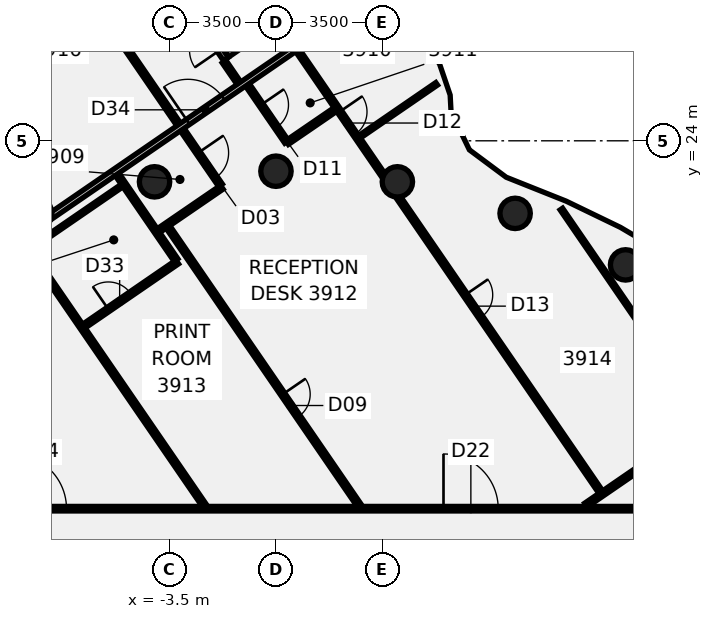
"""IFC4 building model, lengths in metres.
Left out: names, types, materials, properties, quantities, classifications, styles, units other than length and angle.
Written with IfcOpenShell. Run it as: python <this file> out.ifc"""

import sys

from ifc_helpers import new_model, si_unit, direction, frame, frame_2d, origin, origin_2d, place, context, subcontext, project, spatial, rectangle, circle, extrude, element, fill, save


model = new_model("IFC4")
c1 = context("Model", 3, precision=1e-05, world=origin(), true_north=direction((0.0, 1.0)))
c2 = subcontext(c1, "Body", "Model", "MODEL_VIEW")
j1 = project(units=[si_unit("LENGTHUNIT", "METRE"), si_unit("PLANEANGLEUNIT", "RADIAN")], contexts=[c1])
p1 = place(None, origin())
s1 = spatial("IfcSite", under=j1, at=p1, CompositionType="ELEMENT")
p2 = place(p1, origin())
s2 = spatial("IfcBuilding", under=s1, at=p2, CompositionType="ELEMENT")
p3 = place(p2, frame((0.0, 0.0, 159.25)))
s3 = spatial("IfcBuildingStorey", under=s2, at=p3, CompositionType="ELEMENT", Elevation=159.25)
for number, where, z_axis, x_axis in (
    (1, (11.5, 19.919, -0.14), (0.0, 0.0, 1.0), (1.0, 0.0, 0.0)),
    (2, (7.866, 21.613, -0.14), (0.0, 0.0, 1.0), (1.0, 0.0, 0.0)),
    (3, (3.994, 22.651, -0.14), (0.0, 0.0, 1.0), (1.0, 0.0, 0.0)),
    (4, (0.0, 23.0, -0.14), (0.0, 0.0, 1.0), (1.0, 0.0, 0.0)),
    (5, (-3.994, 22.651, -0.14), (0.0, 0.0, 1.0), (1.0, 0.0, 0.0)),
    (6, (-7.866, 21.613, -0.14), (0.0, 0.0, 1.0), (1.0, 0.0, 0.0)),
):
    element("IfcColumn", number, at=place(p3, frame(where, z_axis=z_axis, x_axis=x_axis)), inside=s3, PredefinedType="COLUMN", context=c2, shape_type="SweptSolid", body=[
        extrude(circle(Radius=0.5, at=origin_2d()), origin(), (0.0, 0.0, 1.0), 3.75),
    ])
p4 = place(p3, frame((-13.285, 39.225, 0.0), z_axis=(0.0, 0.0, 1.0), x_axis=(0.566080388425, -0.824350043271, 0.0)))
e7 = element("IfcWall", 7, at=p4, inside=s3, PredefinedType="PARTITIONING", context=c2, shape_type="SweptSolid", body=[
    extrude(rectangle(XDim=20.244, YDim=0.15, at=frame_2d((10.122, 0.0))), origin(), (0.0, 0.0, 1.0), 3.01),
])
p5 = place(p4, frame((18.95, 0.0, 0.0)))
e8 = element("IfcOpeningElement", 8, at=p5, cuts=e7, PredefinedType="OPENING", context=c2, shape_type="SweptSolid", body=[
    extrude(rectangle(XDim=1.0, YDim=2.1, at=frame_2d((0.5, 1.05))), frame((0.0, 0.085, 0.0), z_axis=(0.0, -1.0, 0.0), x_axis=(1.0, 0.0, 0.0)), (0.0, 0.0, 1.0), 0.17),
])
p6 = place(p4, frame((8.769, 0.0, 0.0)))
e9 = element("IfcOpeningElement", 9, at=p6, cuts=e7, PredefinedType="OPENING", context=c2, shape_type="SweptSolid", body=[
    extrude(rectangle(XDim=0.9, YDim=2.1, at=frame_2d((0.45, 1.05))), frame((0.0, 0.085, 0.0), z_axis=(0.0, -1.0, 0.0), x_axis=(1.0, 0.0, 0.0)), (0.0, 0.0, 1.0), 0.17),
])
p7 = place(p4, frame((2.32, 0.0, 0.0)))
e10 = element("IfcOpeningElement", 10, at=p7, cuts=e7, PredefinedType="OPENING", context=c2, shape_type="SweptSolid", body=[
    extrude(rectangle(XDim=0.9, YDim=2.1, at=frame_2d((0.45, 1.05))), frame((0.0, 0.085, 0.0), z_axis=(0.0, -1.0, 0.0), x_axis=(1.0, 0.0, 0.0)), (0.0, 0.0, 1.0), 0.17),
])
p8 = place(p3, frame((-1.705, 26.603, 0.0), z_axis=(0.0, 0.0, 1.0), x_axis=(0.566118871714, -0.824323615511, 0.0)))
e11 = element("IfcWall", 11, at=p8, inside=s3, PredefinedType="PARTITIONING", context=c2, shape_type="SweptSolid", body=[
    extrude(rectangle(XDim=0.859, YDim=0.15, at=frame_2d((0.43, 0.0))), origin(), (0.0, 0.0, 1.0), 3.01),
])
p9 = place(p3, frame((-10.012, 23.154, 0.0), z_axis=(0.0, 0.0, 1.0), x_axis=(0.566093064015, -0.824341338812, 0.0)))
e12 = element("IfcWall", 12, at=p9, inside=s3, PredefinedType="PARTITIONING", context=c2, shape_type="SweptSolid", body=[
    extrude(rectangle(XDim=13.532, YDim=0.15, at=frame_2d((6.766, 0.0))), origin(), (0.0, 0.0, 1.0), 3.01),
])
p10 = place(p3, frame((-5.227, 22.899, 0.0), z_axis=(0.0, 0.0, 1.0), x_axis=(0.566114247823, -0.824326791031, 0.0)))
e13 = element("IfcWall", 13, at=p10, inside=s3, PredefinedType="PARTITIONING", context=c2, shape_type="SweptSolid", body=[
    extrude(rectangle(XDim=3.425, YDim=0.15, at=frame_2d((1.712, 0.0))), origin(), (0.0, 0.0, 1.0), 3.01),
])
p11 = place(p3, frame((-3.55, 21.163, 0.0), z_axis=(0.0, 0.0, 1.0), x_axis=(0.566071104364, -0.824356418549, 0.0)))
e14 = element("IfcWall", 14, at=p11, inside=s3, PredefinedType="PARTITIONING", context=c2, shape_type="SweptSolid", body=[
    extrude(rectangle(XDim=11.117, YDim=0.15, at=frame_2d((5.559, 0.0))), origin(), (0.0, 0.0, 1.0), 3.01),
])
p12 = place(p11, frame((6.67, 0.0, 0.0)))
e15 = element("IfcOpeningElement", 15, at=p12, cuts=e14, PredefinedType="OPENING", context=c2, shape_type="SweptSolid", body=[
    extrude(rectangle(XDim=0.9, YDim=2.1, at=frame_2d((0.45, 1.05))), frame((0.0, 0.085, 0.0), z_axis=(0.0, -1.0, 0.0), x_axis=(1.0, 0.0, 0.0)), (0.0, 0.0, 1.0), 0.17),
])
p13 = place(p3, frame((-0.94, 25.843, 0.0), z_axis=(0.0, 0.0, 1.0), x_axis=(0.566260656611, -0.82422622427, 0.0)))
e16 = element("IfcWall", 16, at=p13, inside=s3, PredefinedType="PARTITIONING", context=c2, shape_type="SweptSolid", body=[
    extrude(rectangle(XDim=2.28, YDim=0.15, at=frame_2d((1.14, 0.0))), origin(), (0.0, 0.0, 1.0), 3.01),
])
p14 = place(p13, frame((0.8, 0.0, 0.0)))
e17 = element("IfcOpeningElement", 17, at=p14, cuts=e16, PredefinedType="OPENING", context=c2, shape_type="SweptSolid", body=[
    extrude(rectangle(XDim=0.9, YDim=2.1, at=frame_2d((0.45, 1.05))), frame((0.0, 0.085, 0.0), z_axis=(0.0, -1.0, 0.0), x_axis=(1.0, 0.0, 0.0)), (0.0, 0.0, 1.0), 0.17),
])
p15 = place(p3, frame((0.708, 26.975, 0.0), z_axis=(0.0, 0.0, 1.0), x_axis=(0.565998885558, -0.824406005283, 0.0)))
e18 = element("IfcWall", 18, at=p15, inside=s3, PredefinedType="PARTITIONING", context=c2, shape_type="SweptSolid", body=[
    extrude(rectangle(XDim=5.202, YDim=0.15, at=frame_2d((2.601, 0.0))), origin(), (0.0, 0.0, 1.0), 3.01),
])
p16 = place(p15, frame((2.449, 0.0, 0.0)))
e19 = element("IfcOpeningElement", 19, at=p16, cuts=e18, PredefinedType="OPENING", context=c2, shape_type="SweptSolid", body=[
    extrude(rectangle(XDim=0.9, YDim=2.1, at=frame_2d((0.45, 1.05))), frame((0.0, 0.085, 0.0), z_axis=(0.0, -1.0, 0.0), x_axis=(1.0, 0.0, 0.0)), (0.0, 0.0, 1.0), 0.17),
])
p17 = place(p3, frame((3.907, 22.315, 0.0), z_axis=(0.0, 0.0, 1.0), x_axis=(0.565998846093, -0.824406032378, 0.0)))
e20 = element("IfcWall", 20, at=p17, inside=s3, PredefinedType="PARTITIONING", context=c2, shape_type="SweptSolid", body=[
    extrude(rectangle(XDim=11.968, YDim=0.15, at=frame_2d((5.984, 0.0))), origin(), (0.0, 0.0, 1.0), 3.01),
])
p18 = place(p17, frame((4.103, 0.0, 0.0)))
e21 = element("IfcOpeningElement", 21, at=p18, cuts=e20, PredefinedType="OPENING", context=c2, shape_type="SweptSolid", body=[
    extrude(rectangle(XDim=0.9, YDim=2.1, at=frame_2d((0.45, 1.05))), frame((0.0, 0.085, 0.0), z_axis=(0.0, -1.0, 0.0), x_axis=(1.0, 0.0, 0.0)), (0.0, 0.0, 1.0), 0.17),
])
p19 = place(p3, frame((9.388, 21.755, 0.0), z_axis=(0.0, 0.0, 1.0), x_axis=(0.566078955543, -0.824351027228, 0.0)))
e22 = element("IfcWall", 22, at=p19, inside=s3, PredefinedType="PARTITIONING", context=c2, shape_type="SweptSolid", body=[
    extrude(rectangle(XDim=8.408, YDim=0.1, at=frame_2d((4.204, 0.0))), origin(), (0.0, 0.0, 1.0), 3.01),
])
p20 = place(p3, frame((-17.065, 11.9, 0.0), z_axis=(0.0, 0.0, 1.0), x_axis=(1.0, 0.0, 0.0)))
e23 = element("IfcWall", 23, at=p20, inside=s3, PredefinedType="PARTITIONING", context=c2, shape_type="SweptSolid", body=[
    extrude(rectangle(XDim=34.165, YDim=0.15, at=frame_2d((17.083, 0.0))), origin(), (0.0, 0.0, 1.0), 3.01),
])
p21 = place(p20, frame((22.576, 0.0, 0.0)))
e24 = element("IfcOpeningElement", 24, at=p21, cuts=e23, PredefinedType="OPENING", context=c2, shape_type="SweptSolid", body=[
    extrude(rectangle(XDim=1.8, YDim=2.1, at=frame_2d((0.9, 1.05))), frame((0.0, 0.085, 0.0), z_axis=(0.0, -1.0, 0.0), x_axis=(1.0, 0.0, 0.0)), (0.0, 0.0, 1.0), 0.17),
])
p22 = place(p20, frame((28.888, 0.0, 0.0)))
e25 = element("IfcOpeningElement", 25, at=p22, cuts=e23, PredefinedType="OPENING", context=c2, shape_type="SweptSolid", body=[
    extrude(rectangle(XDim=1.8, YDim=2.1, at=frame_2d((0.9, 1.05))), frame((0.0, 0.085, 0.0), z_axis=(0.0, -1.0, 0.0), x_axis=(1.0, 0.0, 0.0)), (0.0, 0.0, 1.0), 0.17),
])
p23 = place(p20, frame((8.376, 0.0, 0.0)))
e26 = element("IfcOpeningElement", 26, at=p23, cuts=e23, PredefinedType="OPENING", context=c2, shape_type="SweptSolid", body=[
    extrude(rectangle(XDim=1.8, YDim=2.1, at=frame_2d((0.9, 1.05))), frame((0.0, 0.085, 0.0), z_axis=(0.0, -1.0, 0.0), x_axis=(1.0, 0.0, 0.0)), (0.0, 0.0, 1.0), 0.17),
])
p24 = place(p3, frame((-8.071, 20.46, 0.0), z_axis=(0.0, 0.0, 1.0), x_axis=(0.824324831047, 0.566117101773, 0.0)))
e27 = element("IfcWall", 27, at=p24, inside=s3, PredefinedType="PARTITIONING", context=c2, shape_type="SweptSolid", body=[
    extrude(rectangle(XDim=3.65, YDim=0.1, at=frame_2d((1.825, 0.0))), origin(), (0.0, 0.0, 1.0), 3.01),
])
p25 = place(p3, frame((-6.312, 17.908, 0.0), z_axis=(0.0, 0.0, 1.0), x_axis=(0.824306135323, 0.566144323711, 0.0)))
e28 = element("IfcWall", 28, at=p25, inside=s3, PredefinedType="PARTITIONING", context=c2, shape_type="SweptSolid", body=[
    extrude(rectangle(XDim=3.719, YDim=0.15, at=frame_2d((1.86, 0.0))), origin(), (0.0, 0.0, 1.0), 3.01),
])
p26 = place(p25, frame((0.97, 0.0, 0.0)))
e29 = element("IfcOpeningElement", 29, at=p26, cuts=e28, PredefinedType="OPENING", context=c2, shape_type="SweptSolid", body=[
    extrude(rectangle(XDim=0.9, YDim=2.1, at=frame_2d((0.45, 1.05))), frame((0.0, 0.085, 0.0), z_axis=(0.0, -1.0, 0.0), x_axis=(1.0, 0.0, 0.0)), (0.0, 0.0, 1.0), 0.17),
])
p27 = place(p3, frame((2.751, 24.133, 0.0), z_axis=(0.0, 0.0, 1.0), x_axis=(0.824324458203, 0.566117644672, 0.0)))
e30 = element("IfcWall", 30, at=p27, inside=s3, PredefinedType="PARTITIONING", context=c2, shape_type="SweptSolid", body=[
    extrude(rectangle(XDim=3.075, YDim=0.1, at=frame_2d((1.538, 0.0))), origin(), (0.0, 0.0, 1.0), 3.01),
])
p28 = place(p3, frame((-7.49, 21.466, 0.0), z_axis=(0.0, 0.0, 1.0), x_axis=(0.824395355521, 0.566014397162, 0.0)))
e31 = element("IfcWall", 31, at=p28, inside=s3, PredefinedType="PARTITIONING", context=c2, shape_type="SweptSolid", body=[
    extrude(rectangle(XDim=13.176, YDim=0.2, at=frame_2d((6.588, 0.0))), origin(), (0.0, 0.0, 1.0), 3.01),
])
p29 = place(p28, frame((5.576, 0.0, 0.0)))
e32 = element("IfcOpeningElement", 32, at=p29, cuts=e31, PredefinedType="OPENING", context=c2, shape_type="SweptSolid", body=[
    extrude(rectangle(XDim=1.4, YDim=2.1, at=frame_2d((0.7, 1.05))), frame((0.0, 0.11, 0.0), z_axis=(0.0, -1.0, 0.0), x_axis=(1.0, 0.0, 0.0)), (0.0, 0.0, 1.0), 0.22),
])
p30 = place(p3, frame((-3.859, 21.048, 0.0), z_axis=(0.0, 0.0, 1.0), x_axis=(0.825038611489, 0.565076357276, 0.0)))
e33 = element("IfcWall", 33, at=p30, inside=s3, PredefinedType="PARTITIONING", context=c2, shape_type="SweptSolid", body=[
    extrude(rectangle(XDim=2.52, YDim=0.15, at=frame_2d((1.26, 0.0))), origin(), (0.0, 0.0, 1.0), 3.01),
])
p31 = place(p3, frame((0.366, 23.941, 0.0), z_axis=(0.0, 0.0, 1.0), x_axis=(0.82505756901, 0.565048677389, 0.0)))
e34 = element("IfcWall", 34, at=p31, inside=s3, PredefinedType="PARTITIONING", context=c2, shape_type="SweptSolid", body=[
    extrude(rectangle(XDim=1.919, YDim=0.15, at=frame_2d((0.959, 0.0))), origin(), (0.0, 0.0, 1.0), 3.01),
])
p32 = place(p3, frame((10.196, 12.019, 0.0), z_axis=(0.0, 0.0, 1.0), x_axis=(0.824296186605, 0.566158808771, 0.0)))
e35 = element("IfcWall", 35, at=p32, inside=s3, PredefinedType="PARTITIONING", context=c2, shape_type="SweptSolid", body=[
    extrude(rectangle(XDim=4.845, YDim=0.15, at=frame_2d((2.423, 0.0))), origin(), (0.0, 0.0, 1.0), 3.01),
])
p33 = place(p3, frame((-1.646, 26.693, -0.14), z_axis=(0.0, 0.0, 1.0), x_axis=(-0.566117387095, 0.824324635097, 0.0)))
e36 = element("IfcWall", 36, at=p33, inside=s3, PredefinedType="SHEAR", context=c2, shape_type="SweptSolid", body=[
    extrude(rectangle(XDim=6.7, YDim=0.2, at=frame_2d((3.35, 0.0))), origin(), (0.0, 0.0, 1.0), 3.15),
])
p34 = place(p33, frame((0.35, 0.0, 0.0)))
e37 = element("IfcOpeningElement", 37, at=p34, cuts=e36, PredefinedType="OPENING", context=c2, shape_type="SweptSolid", body=[
    extrude(rectangle(XDim=1.0, YDim=2.1, at=frame_2d((0.5, 1.05))), frame((0.0, 0.11, 0.0), z_axis=(0.0, -1.0, 0.0), x_axis=(1.0, 0.0, 0.0)), (0.0, 0.0, 1.0), 0.22),
])
p35 = place(p3, frame((1.018, 28.643, -0.14), z_axis=(0.0, 0.0, 1.0), x_axis=(-0.824342324494, -0.566091628667, 0.0)))
e38 = element("IfcWall", 38, at=p35, inside=s3, PredefinedType="SHEAR", context=c2, shape_type="SweptSolid", body=[
    extrude(rectangle(XDim=3.2, YDim=0.2, at=frame_2d((1.6, 0.0))), origin(), (0.0, 0.0, 1.0), 3.15),
])
p36 = place(p5, frame((1.0, 0.0, 0.0), z_axis=(0.0, 0.0, 1.0), x_axis=(-1.0, 0.0, 0.0)))
e39 = element("IfcDoor", 39, at=p36, inside=s3, OperationType="SINGLE_SWING_RIGHT", PredefinedType="DOOR", context=c2, shape_type="SweptSolid", body=[
    extrude(rectangle(XDim=1.0, YDim=2.1, at=frame_2d((0.5, 1.05))), frame((0.0, 0.025, 0.0), z_axis=(0.0, -1.0, 0.0), x_axis=(1.0, 0.0, 0.0)), (0.0, 0.0, 1.0), 0.05),
])
fill(e8, e39)
p37 = place(p12, frame((0.9, 0.0, 0.0), z_axis=(0.0, 0.0, 1.0), x_axis=(-1.0, 0.0, 0.0)))
e40 = element("IfcDoor", 40, at=p37, inside=s3, OperationType="SINGLE_SWING_RIGHT", PredefinedType="DOOR", context=c2, shape_type="SweptSolid", body=[
    extrude(rectangle(XDim=0.9, YDim=2.1, at=frame_2d((0.45, 1.05))), frame((0.0, 0.025, 0.0), z_axis=(0.0, -1.0, 0.0), x_axis=(1.0, 0.0, 0.0)), (0.0, 0.0, 1.0), 0.05),
])
fill(e15, e40)
p38 = place(p14, origin())
e41 = element("IfcDoor", 41, at=p38, inside=s3, OperationType="SINGLE_SWING_LEFT", PredefinedType="DOOR", context=c2, shape_type="SweptSolid", body=[
    extrude(rectangle(XDim=0.9, YDim=2.1, at=frame_2d((0.45, 1.05))), frame((0.0, 0.025, 0.0), z_axis=(0.0, -1.0, 0.0), x_axis=(1.0, 0.0, 0.0)), (0.0, 0.0, 1.0), 0.05),
])
fill(e17, e41)
p39 = place(p16, origin())
e42 = element("IfcDoor", 42, at=p39, inside=s3, OperationType="SINGLE_SWING_LEFT", PredefinedType="DOOR", context=c2, shape_type="SweptSolid", body=[
    extrude(rectangle(XDim=0.9, YDim=2.1, at=frame_2d((0.45, 1.05))), frame((0.0, 0.025, 0.0), z_axis=(0.0, -1.0, 0.0), x_axis=(1.0, 0.0, 0.0)), (0.0, 0.0, 1.0), 0.05),
])
fill(e19, e42)
p40 = place(p18, origin())
e43 = element("IfcDoor", 43, at=p40, inside=s3, OperationType="SINGLE_SWING_RIGHT", PredefinedType="DOOR", context=c2, shape_type="SweptSolid", body=[
    extrude(rectangle(XDim=0.9, YDim=2.1, at=frame_2d((0.45, 1.05))), frame((0.0, 0.025, 0.0), z_axis=(0.0, -1.0, 0.0), x_axis=(1.0, 0.0, 0.0)), (0.0, 0.0, 1.0), 0.05),
])
fill(e21, e43)
p41 = place(p21, frame((1.8, 0.0, 0.0), z_axis=(0.0, 0.0, 1.0), x_axis=(-1.0, 0.0, 0.0)))
e44 = element("IfcDoor", 44, at=p41, inside=s3, OperationType="DOUBLE_DOOR_SINGLE_SWING", PredefinedType="DOOR", context=c2, shape_type="SweptSolid", body=[
    extrude(rectangle(XDim=1.8, YDim=2.1, at=frame_2d((0.9, 1.05))), frame((0.0, 0.025, 0.0), z_axis=(0.0, -1.0, 0.0), x_axis=(1.0, 0.0, 0.0)), (0.0, 0.0, 1.0), 0.05),
])
fill(e24, e44)
p42 = place(p23, origin())
e45 = element("IfcDoor", 45, at=p42, inside=s3, OperationType="DOUBLE_DOOR_SINGLE_SWING", PredefinedType="DOOR", context=c2, shape_type="SweptSolid", body=[
    extrude(rectangle(XDim=1.8, YDim=2.1, at=frame_2d((0.9, 1.05))), frame((0.0, 0.025, 0.0), z_axis=(0.0, -1.0, 0.0), x_axis=(1.0, 0.0, 0.0)), (0.0, 0.0, 1.0), 0.05),
])
fill(e26, e45)
p43 = place(p26, origin())
e46 = element("IfcDoor", 46, at=p43, inside=s3, OperationType="SINGLE_SWING_RIGHT", PredefinedType="DOOR", context=c2, shape_type="SweptSolid", body=[
    extrude(rectangle(XDim=0.9, YDim=2.1, at=frame_2d((0.45, 1.05))), frame((0.0, 0.025, 0.0), z_axis=(0.0, -1.0, 0.0), x_axis=(1.0, 0.0, 0.0)), (0.0, 0.0, 1.0), 0.05),
])
fill(e29, e46)
p44 = place(p29, frame((1.4, 0.0, 0.0), z_axis=(0.0, 0.0, 1.0), x_axis=(-1.0, 0.0, 0.0)))
e47 = element("IfcDoor", 47, at=p44, inside=s3, OperationType="DOUBLE_DOOR_SINGLE_SWING", PredefinedType="DOOR", context=c2, shape_type="SweptSolid", body=[
    extrude(rectangle(XDim=1.4, YDim=2.1, at=frame_2d((0.7, 1.05))), frame((0.0, 0.025, 0.0), z_axis=(0.0, -1.0, 0.0), x_axis=(1.0, 0.0, 0.0)), (0.0, 0.0, 1.0), 0.05),
])
fill(e32, e47)
save(model, sys.argv[1])
